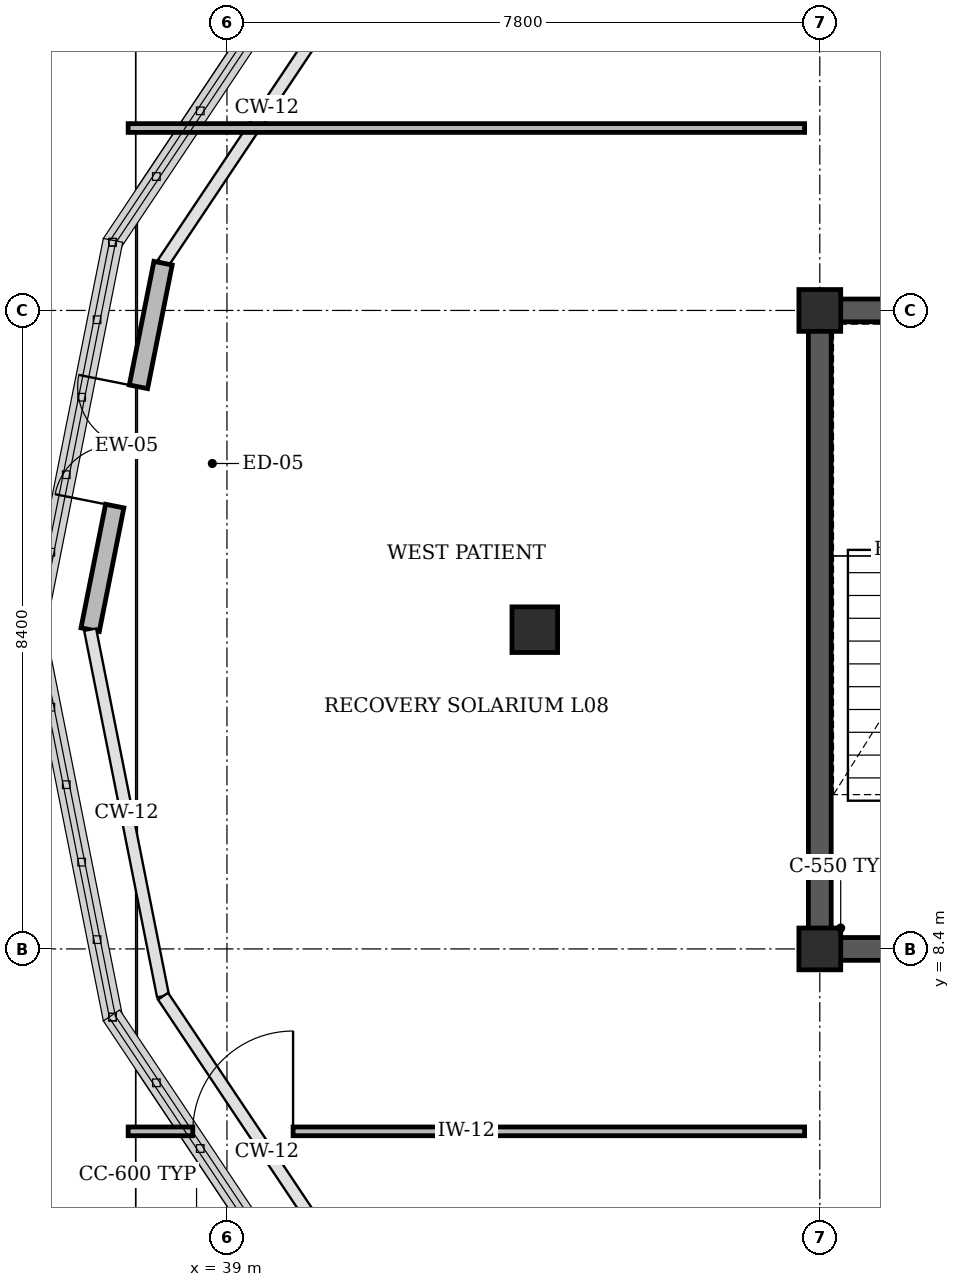
"""IFC4 building model, lengths in metres.
Left out: names, types, materials, properties, quantities, classifications, styles, units other than length and angle.
Written with IfcOpenShell. Run it as: python <this file> out.ifc"""

import sys

from ifc_helpers import new_model, si_unit, direction, frame, frame_2d, origin, origin_2d, place, context, subcontext, project, spatial, rectangle, circle, extrude, element, fill, save


model = new_model("IFC4")
c1 = context("Model", 3, precision=1e-05, world=origin(), true_north=direction((0.0, 1.0)))
c2 = subcontext(c1, "Body", "Model", "MODEL_VIEW")
j1 = project(units=[si_unit("LENGTHUNIT", "METRE"), si_unit("PLANEANGLEUNIT", "RADIAN")], contexts=[c1])
p1 = place(None, origin())
s1 = spatial("IfcSite", under=j1, at=p1, CompositionType="ELEMENT")
p2 = place(p1, origin())
s2 = spatial("IfcBuilding", under=s1, at=p2, CompositionType="ELEMENT")
p3 = place(p2, frame((0.0, 0.0, 34.8)))
s3 = spatial("IfcBuildingStorey", under=s2, at=p3, CompositionType="ELEMENT", Elevation=34.8)
p4 = place(p3, frame((46.65, 16.8, 0.0), z_axis=(0.0, 0.0, 1.0), x_axis=(1.0, 0.0, 0.0)))
e1 = element("IfcWall", 1, at=p4, inside=s3, PredefinedType="SHEAR", context=c2, shape_type="SweptSolid", body=[
    extrude(rectangle(XDim=8.1, YDim=0.3, at=frame_2d((4.05, 0.0))), origin(), (0.0, 0.0, 1.0), 3.92),
])
p5 = place(p3, frame((46.8, 8.4, 0.0), z_axis=(0.0, 0.0, 1.0), x_axis=(0.0, 1.0, 0.0)))
e2 = element("IfcWall", 2, at=p5, inside=s3, PredefinedType="SHEAR", context=c2, shape_type="SweptSolid", body=[
    extrude(rectangle(XDim=8.4, YDim=0.3, at=frame_2d((4.2, 0.0))), origin(), (0.0, 0.0, 1.0), 3.92),
])
for number, where, z_axis, x_axis in (
    (3, (46.8, 8.4, 0.0), (0.0, 0.0, 1.0), (1.0, 0.0, 0.0)),
    (4, (46.8, 16.8, 0.0), (0.0, 0.0, 1.0), (1.0, 0.0, 0.0)),
):
    element("IfcColumn", number, at=place(p3, frame(where, z_axis=z_axis, x_axis=x_axis)), inside=s3, PredefinedType="COLUMN", context=c2, shape_type="SweptSolid", body=[
        extrude(rectangle(XDim=0.55, YDim=0.55, at=origin_2d()), origin(), (0.0, 0.0, 1.0), 4.2),
    ])
p6 = place(p3, frame((43.05, 12.6, 0.0), z_axis=(0.0, 0.0, 1.0), x_axis=(1.0, 0.0, 0.0)))
e5 = element("IfcColumn", 5, at=p6, inside=s3, PredefinedType="PILASTER", context=c2, shape_type="SweptSolid", body=[
    extrude(circle(Radius=0.3, at=origin_2d()), origin(), (0.0, 0.0, 1.0), 3.95),
])
p7 = place(p3, frame((37.2, 12.6, 0.0), z_axis=(0.0, 0.0, 1.0), x_axis=(0.195113286981, 0.980780712108, 0.0)))
e6 = element("IfcWall", 6, at=p7, inside=s3, PredefinedType="STANDARD", context=c2, shape_type="SweptSolid", body=[
    extrude(rectangle(XDim=4.916, YDim=0.245, at=frame_2d((2.458, 0.0))), origin(), (0.0, 0.0, 1.0), 3.32),
])
p8 = place(p7, frame((1.658, 0.0, 0.0)))
e7 = element("IfcOpeningElement", 7, at=p8, cuts=e6, PredefinedType="OPENING", context=c2, shape_type="SweptSolid", body=[
    extrude(rectangle(XDim=1.6, YDim=2.2, at=frame_2d((0.8, 1.1))), frame((0.0, 0.133, 0.0), z_axis=(0.0, -1.0, 0.0), x_axis=(1.0, 0.0, 0.0)), (0.0, 0.0, 1.0), 0.265),
])
p9 = place(p3, frame((46.8, 8.4, 0.0), z_axis=(0.0, 0.0, 1.0), x_axis=(1.0, 0.0, 0.0)))
e8 = element("IfcWall", 8, at=p9, inside=s3, PredefinedType="SHEAR", context=c2, shape_type="SweptSolid", body=[
    extrude(rectangle(XDim=4.15, YDim=0.3, at=frame_2d((2.075, 0.0))), origin(), (0.0, 0.0, 1.0), 4.2),
])
p10 = place(p9, frame((1.515, 0.0, 0.0)))
e9 = element("IfcOpeningElement", 9, at=p10, cuts=e8, PredefinedType="OPENING", context=c2, shape_type="SweptSolid", body=[
    extrude(rectangle(XDim=1.12, YDim=2.15, at=frame_2d((0.56, 1.075))), frame((0.0, 0.16, 0.0), z_axis=(0.0, -1.0, 0.0), x_axis=(1.0, 0.0, 0.0)), (0.0, 0.0, 1.0), 0.32),
])
p11 = place(p3, frame((37.7, 6.0, 0.0), z_axis=(0.0, 0.0, 1.0), x_axis=(1.0, 0.0, 0.0)))
e10 = element("IfcWall", 10, at=p11, inside=s3, PredefinedType="PARTITIONING", context=c2, shape_type="SweptSolid", body=[
    extrude(rectangle(XDim=8.9, YDim=0.115, at=frame_2d((4.45, 0.0))), origin(), (0.0, 0.0, 1.0), 3.9),
])
p12 = place(p11, frame((0.85, 0.0, 0.0)))
e11 = element("IfcOpeningElement", 11, at=p12, cuts=e10, PredefinedType="OPENING", context=c2, shape_type="SweptSolid", body=[
    extrude(rectangle(XDim=1.32, YDim=2.15, at=frame_2d((0.66, 1.075))), frame((0.0, 0.067, 0.0), z_axis=(0.0, -1.0, 0.0), x_axis=(1.0, 0.0, 0.0)), (0.0, 0.0, 1.0), 0.135),
])
p13 = place(p3, frame((37.7, 19.2, 0.0), z_axis=(0.0, 0.0, 1.0), x_axis=(1.0, 0.0, 0.0)))
e12 = element("IfcWall", 12, at=p13, inside=s3, PredefinedType="PARTITIONING", context=c2, shape_type="SweptSolid", body=[
    extrude(rectangle(XDim=8.9, YDim=0.115, at=frame_2d((4.45, 0.0))), origin(), (0.0, 0.0, 1.0), 3.9),
])
p14 = place(p8, origin())
e13 = element("IfcDoor", 13, at=p14, inside=s3, OperationType="DOUBLE_DOOR_SINGLE_SWING", PredefinedType="DOOR", context=c2, shape_type="SweptSolid", body=[
    extrude(rectangle(XDim=1.6, YDim=2.2, at=frame_2d((0.8, 1.1))), frame((0.0, 0.025, 0.0), z_axis=(0.0, -1.0, 0.0), x_axis=(1.0, 0.0, 0.0)), (0.0, 0.0, 1.0), 0.05),
])
fill(e7, e13)
p15 = place(p12, origin())
e14 = element("IfcDoor", 14, at=p15, inside=s3, OperationType="SINGLE_SWING_RIGHT", PredefinedType="DOOR", context=c2, shape_type="SweptSolid", body=[
    extrude(rectangle(XDim=1.32, YDim=2.15, at=frame_2d((0.66, 1.075))), frame((0.0, 0.025, 0.0), z_axis=(0.0, -1.0, 0.0), x_axis=(1.0, 0.0, 0.0)), (0.0, 0.0, 1.0), 0.05),
])
fill(e11, e14)
save(model, sys.argv[1])
